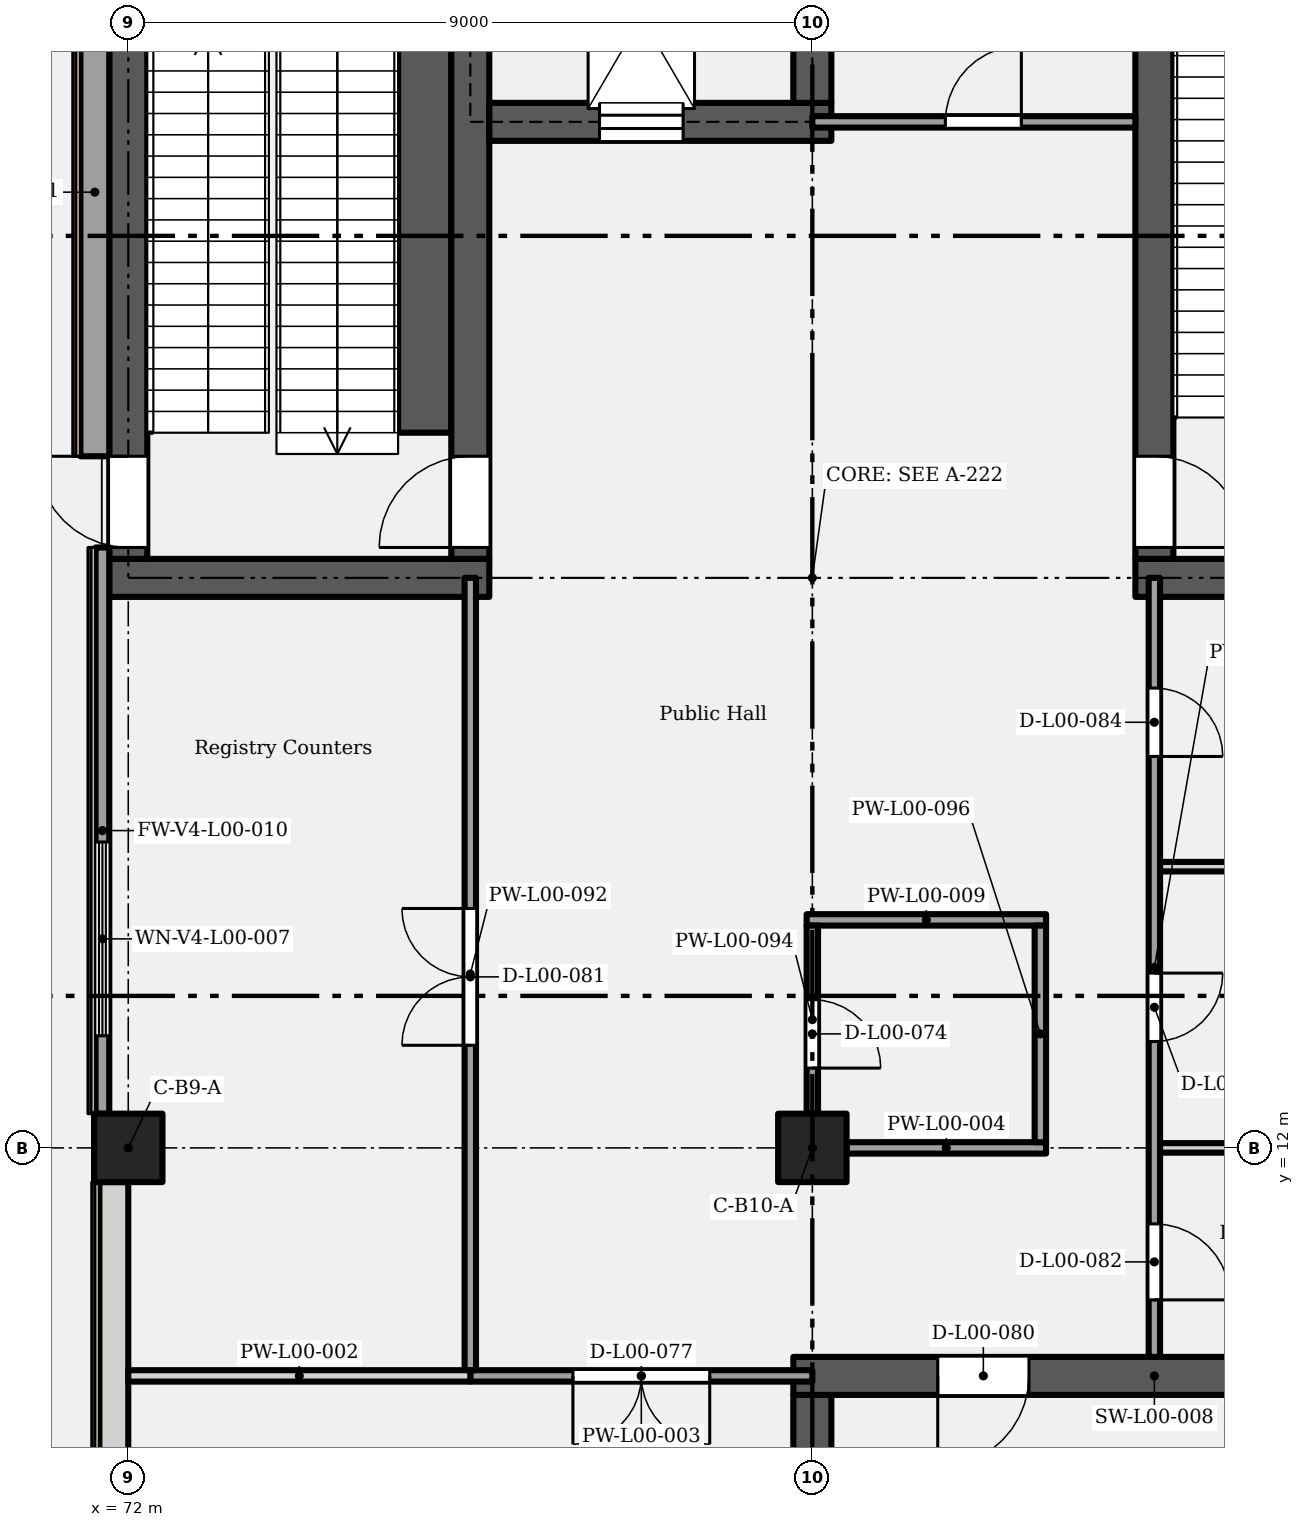
"""IFC4 building model, lengths in metres.
Left out: names, types, materials, properties, quantities, classifications, styles, units other than length and angle.
Written with IfcOpenShell. Run it as: python <this file> out.ifc"""

import sys

from ifc_helpers import new_model, si_unit, direction, frame, frame_2d, origin, origin_2d, place, context, subcontext, project, spatial, rectangle, extrude, element, fill, save


model = new_model("IFC4")
c1 = context("Model", 3, precision=1e-05, world=origin(), true_north=direction((0.0, 1.0)))
c2 = subcontext(c1, "Body", "Model", "MODEL_VIEW")
j1 = project(units=[si_unit("LENGTHUNIT", "METRE"), si_unit("PLANEANGLEUNIT", "RADIAN")], contexts=[c1])
p1 = place(None, origin())
s1 = spatial("IfcSite", under=j1, at=p1, CompositionType="ELEMENT")
p2 = place(p1, origin())
s2 = spatial("IfcBuilding", under=s1, at=p2, CompositionType="ELEMENT")
p3 = place(p2, origin())
s3 = spatial("IfcBuildingStorey", under=s2, at=p3, CompositionType="ELEMENT", Elevation=0.0)
for number, where, z_axis, x_axis in (
    (1, (72.0, 12.0, 0.0), (0.0, 0.0, 1.0), (1.0, 0.0, 0.0)),
    (2, (81.0, 12.0, 0.0), (0.0, 0.0, 1.0), (1.0, 0.0, 0.0)),
):
    element("IfcColumn", number, at=place(p3, frame(where, z_axis=z_axis, x_axis=x_axis)), inside=s3, PredefinedType="COLUMN", context=c2, shape_type="SweptSolid", body=[
        extrude(rectangle(XDim=0.9, YDim=0.9, at=origin_2d()), origin(), (0.0, 0.0, 1.0), 6.6),
    ])
p4 = place(p3, frame((81.0, 0.45, 0.0), z_axis=(0.0, 0.0, 1.0), x_axis=(0.0, 1.0, 0.0)))
e3 = element("IfcWall", 3, at=p4, inside=s3, PredefinedType="SHEAR", context=c2, shape_type="SweptSolid", body=[
    extrude(rectangle(XDim=8.3, YDim=0.5, at=frame_2d((4.15, 0.0))), origin(), (0.0, 0.0, 1.0), 6.3),
])
p5 = place(p3, frame((80.75, 9.0, 0.0), z_axis=(0.0, 0.0, 1.0), x_axis=(1.0, 0.0, 0.0)))
e4 = element("IfcWall", 4, at=p5, inside=s3, PredefinedType="SHEAR", context=c2, shape_type="SweptSolid", body=[
    extrude(rectangle(XDim=9.5, YDim=0.5, at=frame_2d((4.75, 0.0))), origin(), (0.0, 0.0, 1.0), 6.3),
])
p6 = place(p5, frame((3.1, 0.0, 0.0), z_axis=(0.0, 0.0, 1.0), x_axis=(-1.0, 0.0, 0.0)))
e5 = element("IfcOpeningElement", 5, at=p6, cuts=e4, PredefinedType="OPENING", context=c2, shape_type="SweptSolid", body=[
    extrude(rectangle(XDim=1.2, YDim=2.4, at=frame_2d((0.6, 1.2))), frame((0.0, 0.26, 0.0), z_axis=(0.0, -1.0, 0.0), x_axis=(1.0, 0.0, 0.0)), (0.0, 0.0, 1.0), 0.52),
])
for number, where, z_axis, x_axis in (
    (6, (71.75, 19.5, 0.0), (0.0, 0.0, 1.0), (1.0, 0.0, 0.0)),
    (7, (85.25, 19.5, 0.0), (0.0, 0.0, 1.0), (1.0, 0.0, 0.0)),
):
    element("IfcWall", number, at=place(p3, frame(where, z_axis=z_axis, x_axis=x_axis)), inside=s3, PredefinedType="SHEAR", context=c2, shape_type="SweptSolid", body=[
        extrude(rectangle(XDim=5.0, YDim=0.5, at=frame_2d((2.5, 0.0))), origin(), (0.0, 0.0, 1.0), 6.3),
    ])
p7 = place(p3, frame((72.0, 19.75, 0.0), z_axis=(0.0, 0.0, 1.0), x_axis=(0.0, 1.0, 0.0)))
e8 = element("IfcWall", 8, at=p7, inside=s3, PredefinedType="SHEAR", context=c2, shape_type="SweptSolid", body=[
    extrude(rectangle(XDim=8.3, YDim=0.5, at=frame_2d((4.15, 0.0))), origin(), (0.0, 0.0, 1.0), 6.3),
])
p8 = place(p7, frame((0.15, 0.0, 0.0)))
e9 = element("IfcOpeningElement", 9, at=p8, cuts=e8, PredefinedType="OPENING", context=c2, shape_type="SweptSolid", body=[
    extrude(rectangle(XDim=1.2, YDim=2.1, at=frame_2d((0.6, 1.05))), frame((0.0, 0.26, 0.0), z_axis=(0.0, -1.0, 0.0), x_axis=(1.0, 0.0, 0.0)), (0.0, 0.0, 1.0), 0.52),
])
p9 = place(p3, frame((76.5, 19.75, 0.0), z_axis=(0.0, 0.0, 1.0), x_axis=(0.0, 1.0, 0.0)))
e10 = element("IfcWall", 10, at=p9, inside=s3, PredefinedType="SHEAR", context=c2, shape_type="SweptSolid", body=[
    extrude(rectangle(XDim=8.5, YDim=0.5, at=frame_2d((4.25, 0.0))), origin(), (0.0, 0.0, 1.0), 6.3),
])
p10 = place(p9, frame((0.15, 0.0, 0.0)))
e11 = element("IfcOpeningElement", 11, at=p10, cuts=e10, PredefinedType="OPENING", context=c2, shape_type="SweptSolid", body=[
    extrude(rectangle(XDim=1.2, YDim=2.4, at=frame_2d((0.6, 1.2))), frame((0.0, 0.26, 0.0), z_axis=(0.0, -1.0, 0.0), x_axis=(1.0, 0.0, 0.0)), (0.0, 0.0, 1.0), 0.52),
])
p11 = place(p3, frame((85.5, 19.75, 0.0), z_axis=(0.0, 0.0, 1.0), x_axis=(0.0, 1.0, 0.0)))
e12 = element("IfcWall", 12, at=p11, inside=s3, PredefinedType="SHEAR", context=c2, shape_type="SweptSolid", body=[
    extrude(rectangle(XDim=8.5, YDim=0.5, at=frame_2d((4.25, 0.0))), origin(), (0.0, 0.0, 1.0), 6.3),
])
p12 = place(p11, frame((1.35, 0.0, 0.0), z_axis=(0.0, 0.0, 1.0), x_axis=(-1.0, 0.0, 0.0)))
e13 = element("IfcOpeningElement", 13, at=p12, cuts=e12, PredefinedType="OPENING", context=c2, shape_type="SweptSolid", body=[
    extrude(rectangle(XDim=1.2, YDim=2.4, at=frame_2d((0.6, 1.2))), frame((0.0, 0.26, 0.0), z_axis=(0.0, -1.0, 0.0), x_axis=(1.0, 0.0, 0.0)), (0.0, 0.0, 1.0), 0.52),
])
p13 = place(p3, frame((76.75, 25.5, 0.0), z_axis=(0.0, 0.0, 1.0), x_axis=(1.0, 0.0, 0.0)))
e14 = element("IfcWall", 14, at=p13, inside=s3, PredefinedType="SHEAR", context=c2, shape_type="SweptSolid", body=[
    extrude(rectangle(XDim=4.5, YDim=0.5, at=frame_2d((2.25, 0.0))), origin(), (0.0, 0.0, 1.0), 6.3),
])
p14 = place(p13, frame((1.45, 0.0, 0.0)))
e15 = element("IfcOpeningElement", 15, at=p14, cuts=e14, PredefinedType="OPENING", context=c2, shape_type="SweptSolid", body=[
    extrude(rectangle(XDim=1.1, YDim=2.1, at=frame_2d((0.55, 1.05))), frame((0.0, 0.26, 0.0), z_axis=(0.0, -1.0, 0.0), x_axis=(1.0, 0.0, 0.0)), (0.0, 0.0, 1.0), 0.52),
])
p15 = place(p3, frame((81.0, 25.75, 0.0), z_axis=(0.0, 0.0, 1.0), x_axis=(0.0, 1.0, 0.0)))
e16 = element("IfcWall", 16, at=p15, inside=s3, PredefinedType="SHEAR", context=c2, shape_type="SweptSolid", body=[
    extrude(rectangle(XDim=2.3, YDim=0.5, at=frame_2d((1.15, 0.0))), origin(), (0.0, 0.0, 1.0), 6.3),
])
p16 = place(p3, frame((71.81, 0.45, 0.0), z_axis=(0.0, 0.0, 1.0), x_axis=(0.0, 1.0, 0.0)))
e17 = element("IfcWall", 17, at=p16, inside=s3, PredefinedType="SOLIDWALL", context=c2, shape_type="SweptSolid", body=[
    extrude(rectangle(XDim=11.1, YDim=0.38, at=frame_2d((5.55, 0.0))), origin(), (0.0, 0.0, 1.0), 6.3),
])
p17 = place(p16, frame((1.275, 0.0, 0.9)))
e18 = element("IfcOpeningElement", 18, at=p17, cuts=e17, PredefinedType="OPENING", context=c2, shape_type="SweptSolid", body=[
    extrude(rectangle(XDim=2.55, YDim=2.55, at=frame_2d((1.275, 1.275))), frame((0.0, 0.2, 0.0), z_axis=(0.0, -1.0, 0.0), x_axis=(1.0, 0.0, 0.0)), (0.0, 0.0, 1.0), 0.4),
])
p18 = place(p3, frame((71.66, 12.45, 0.0), z_axis=(0.0, 0.0, 1.0), x_axis=(0.0, 1.0, 0.0)))
e19 = element("IfcWall", 19, at=p18, inside=s3, PredefinedType="SOLIDWALL", context=c2, shape_type="SweptSolid", body=[
    extrude(rectangle(XDim=7.45, YDim=0.18, at=frame_2d((3.725, 0.0))), origin(), (0.0, 0.0, 1.0), 6.3),
])
p19 = place(p18, frame((1.025, 0.0, 0.9)))
e20 = element("IfcOpeningElement", 20, at=p19, cuts=e19, PredefinedType="OPENING", context=c2, shape_type="SweptSolid", body=[
    extrude(rectangle(XDim=2.55, YDim=2.55, at=frame_2d((1.275, 1.275))), frame((0.0, 0.1, 0.0), z_axis=(0.0, -1.0, 0.0), x_axis=(1.0, 0.0, 0.0)), (0.0, 0.0, 1.0), 0.2),
])
p20 = place(p3, frame((71.56, 21.1, 0.0), z_axis=(0.0, 0.0, 1.0), x_axis=(0.0, 1.0, 0.0)))
e21 = element("IfcWall", 21, at=p20, inside=s3, PredefinedType="SOLIDWALL", context=c2, shape_type="SweptSolid", body=[
    extrude(rectangle(XDim=6.95, YDim=0.38, at=frame_2d((3.475, 0.0))), origin(), (0.0, 0.0, 1.0), 6.3),
])
p21 = place(p3, frame((72.0, 9.0, 0.0), z_axis=(0.0, 0.0, 1.0), x_axis=(1.0, 0.0, 0.0)))
e22 = element("IfcWall", 22, at=p21, inside=s3, PredefinedType="PARTITIONING", context=c2, shape_type="SweptSolid", body=[
    extrude(rectangle(XDim=4.5, YDim=0.15, at=frame_2d((2.25, 0.0))), origin(), (0.0, 0.0, 1.0), 6.3),
])
p22 = place(p3, frame((76.5, 9.0, 0.0), z_axis=(0.0, 0.0, 1.0), x_axis=(1.0, 0.0, 0.0)))
e23 = element("IfcWall", 23, at=p22, inside=s3, PredefinedType="PARTITIONING", context=c2, shape_type="SweptSolid", body=[
    extrude(rectangle(XDim=4.5, YDim=0.15, at=frame_2d((2.25, 0.0))), origin(), (0.0, 0.0, 1.0), 6.3),
])
p23 = place(p22, frame((3.15, 0.0, 0.0), z_axis=(0.0, 0.0, 1.0), x_axis=(-1.0, 0.0, 0.0)))
e24 = element("IfcOpeningElement", 24, at=p23, cuts=e23, PredefinedType="OPENING", context=c2, shape_type="SweptSolid", body=[
    extrude(rectangle(XDim=1.8, YDim=2.4, at=frame_2d((0.9, 1.2))), frame((0.0, 0.085, 0.0), z_axis=(0.0, -1.0, 0.0), x_axis=(1.0, 0.0, 0.0)), (0.0, 0.0, 1.0), 0.17),
])
p24 = place(p3, frame((81.45, 12.0, 0.0), z_axis=(0.0, 0.0, 1.0), x_axis=(1.0, 0.0, 0.0)))
e25 = element("IfcWall", 25, at=p24, inside=s3, PredefinedType="PARTITIONING", context=c2, shape_type="SweptSolid", body=[
    extrude(rectangle(XDim=2.625, YDim=0.15, at=frame_2d((1.312, 0.0))), origin(), (0.0, 0.0, 1.0), 5.55),
])
p25 = place(p3, frame((85.575, 12.0, 0.0), z_axis=(0.0, 0.0, 1.0), x_axis=(1.0, 0.0, 0.0)))
e26 = element("IfcWall", 26, at=p25, inside=s3, PredefinedType="PARTITIONING", context=c2, shape_type="SweptSolid", body=[
    extrude(rectangle(XDim=3.975, YDim=0.125, at=frame_2d((1.988, 0.0))), origin(), (0.0, 0.0, 1.0), 5.55),
])
p26 = place(p3, frame((80.925, 15.0, 0.0), z_axis=(0.0, 0.0, 1.0), x_axis=(1.0, 0.0, 0.0)))
e27 = element("IfcWall", 27, at=p26, inside=s3, PredefinedType="PARTITIONING", context=c2, shape_type="SweptSolid", body=[
    extrude(rectangle(XDim=3.15, YDim=0.15, at=frame_2d((1.575, 0.0))), origin(), (0.0, 0.0, 1.0), 6.3),
])
p27 = place(p3, frame((85.575, 15.7, 0.0), z_axis=(0.0, 0.0, 1.0), x_axis=(1.0, 0.0, 0.0)))
e28 = element("IfcWall", 28, at=p27, inside=s3, PredefinedType="PARTITIONING", context=c2, shape_type="SweptSolid", body=[
    extrude(rectangle(XDim=4.675, YDim=0.125, at=frame_2d((2.337, 0.0))), origin(), (0.0, 0.0, 1.0), 6.3),
])
p28 = place(p3, frame((81.0, 25.5, 0.0), z_axis=(0.0, 0.0, 1.0), x_axis=(1.0, 0.0, 0.0)))
e29 = element("IfcWall", 29, at=p28, inside=s3, PredefinedType="PARTITIONING", context=c2, shape_type="SweptSolid", body=[
    extrude(rectangle(XDim=4.25, YDim=0.15, at=frame_2d((2.125, 0.0))), origin(), (0.0, 0.0, 1.0), 6.3),
])
p29 = place(p28, frame((1.75, 0.0, 0.0)))
e30 = element("IfcOpeningElement", 30, at=p29, cuts=e29, PredefinedType="OPENING", context=c2, shape_type="SweptSolid", body=[
    extrude(rectangle(XDim=1.0, YDim=2.4, at=frame_2d((0.5, 1.2))), frame((0.0, 0.085, 0.0), z_axis=(0.0, -1.0, 0.0), x_axis=(1.0, 0.0, 0.0)), (0.0, 0.0, 1.0), 0.17),
])
p30 = place(p3, frame((76.5, 9.075, 0.0), z_axis=(0.0, 0.0, 1.0), x_axis=(0.0, 1.0, 0.0)))
e31 = element("IfcWall", 31, at=p30, inside=s3, PredefinedType="PARTITIONING", context=c2, shape_type="SweptSolid", body=[
    extrude(rectangle(XDim=10.425, YDim=0.15, at=frame_2d((5.212, 0.0))), origin(), (0.0, 0.0, 1.0), 6.3),
])
p31 = place(p30, frame((4.275, 0.0, 0.0)))
e32 = element("IfcOpeningElement", 32, at=p31, cuts=e31, PredefinedType="OPENING", context=c2, shape_type="SweptSolid", body=[
    extrude(rectangle(XDim=1.8, YDim=2.4, at=frame_2d((0.9, 1.2))), frame((0.0, 0.085, 0.0), z_axis=(0.0, -1.0, 0.0), x_axis=(1.0, 0.0, 0.0)), (0.0, 0.0, 1.0), 0.17),
])
p32 = place(p3, frame((81.0, 12.45, 0.0), z_axis=(0.0, 0.0, 1.0), x_axis=(0.0, 1.0, 0.0)))
e33 = element("IfcWall", 33, at=p32, inside=s3, PredefinedType="PARTITIONING", context=c2, shape_type="SweptSolid", body=[
    extrude(rectangle(XDim=2.475, YDim=0.15, at=frame_2d((1.238, 0.0))), origin(), (0.0, 0.0, 1.0), 5.35),
])
p33 = place(p32, frame((1.5, 0.0, 0.0), z_axis=(0.0, 0.0, 1.0), x_axis=(-1.0, 0.0, 0.0)))
e34 = element("IfcOpeningElement", 34, at=p33, cuts=e33, PredefinedType="OPENING", context=c2, shape_type="SweptSolid", body=[
    extrude(rectangle(XDim=0.9, YDim=2.4, at=frame_2d((0.45, 1.2))), frame((0.0, 0.085, 0.0), z_axis=(0.0, -1.0, 0.0), x_axis=(1.0, 0.0, 0.0)), (0.0, 0.0, 1.0), 0.17),
])
p34 = place(p3, frame((84.0, 12.075, 0.0), z_axis=(0.0, 0.0, 1.0), x_axis=(0.0, 1.0, 0.0)))
e35 = element("IfcWall", 35, at=p34, inside=s3, PredefinedType="PARTITIONING", context=c2, shape_type="SweptSolid", body=[
    extrude(rectangle(XDim=2.85, YDim=0.15, at=frame_2d((1.425, 0.0))), origin(), (0.0, 0.0, 1.0), 6.3),
])
p35 = place(p3, frame((85.5, 9.25, 0.0), z_axis=(0.0, 0.0, 1.0), x_axis=(0.0, 1.0, 0.0)))
e36 = element("IfcWall", 36, at=p35, inside=s3, PredefinedType="PARTITIONING", context=c2, shape_type="SweptSolid", body=[
    extrude(rectangle(XDim=10.25, YDim=0.15, at=frame_2d((5.125, 0.0))), origin(), (0.0, 0.0, 1.0), 6.3),
])
p36 = place(p35, frame((1.75, 0.0, 0.0), z_axis=(0.0, 0.0, 1.0), x_axis=(-1.0, 0.0, 0.0)))
e37 = element("IfcOpeningElement", 37, at=p36, cuts=e36, PredefinedType="OPENING", context=c2, shape_type="SweptSolid", body=[
    extrude(rectangle(XDim=1.0, YDim=2.4, at=frame_2d((0.5, 1.2))), frame((0.0, 0.085, 0.0), z_axis=(0.0, -1.0, 0.0), x_axis=(1.0, 0.0, 0.0)), (0.0, 0.0, 1.0), 0.17),
])
p37 = place(p35, frame((5.05, 0.0, 0.0), z_axis=(0.0, 0.0, 1.0), x_axis=(-1.0, 0.0, 0.0)))
e38 = element("IfcOpeningElement", 38, at=p37, cuts=e36, PredefinedType="OPENING", context=c2, shape_type="SweptSolid", body=[
    extrude(rectangle(XDim=0.9, YDim=2.4, at=frame_2d((0.45, 1.2))), frame((0.0, 0.085, 0.0), z_axis=(0.0, -1.0, 0.0), x_axis=(1.0, 0.0, 0.0)), (0.0, 0.0, 1.0), 0.17),
])
p38 = place(p35, frame((8.8, 0.0, 0.0), z_axis=(0.0, 0.0, 1.0), x_axis=(-1.0, 0.0, 0.0)))
e39 = element("IfcOpeningElement", 39, at=p38, cuts=e36, PredefinedType="OPENING", context=c2, shape_type="SweptSolid", body=[
    extrude(rectangle(XDim=0.9, YDim=2.4, at=frame_2d((0.45, 1.2))), frame((0.0, 0.085, 0.0), z_axis=(0.0, -1.0, 0.0), x_axis=(1.0, 0.0, 0.0)), (0.0, 0.0, 1.0), 0.17),
])
p39 = place(p3, frame((75.9, 21.41, 0.0), z_axis=(0.0, 0.0, 1.0), x_axis=(0.0, 1.0, 0.0)))
e40 = element("IfcWall", 40, at=p39, inside=s3, PredefinedType="SHEAR", context=c2, shape_type="SweptSolid", body=[
    extrude(rectangle(XDim=6.64, YDim=0.7, at=frame_2d((3.32, 0.0))), origin(), (0.0, 0.0, 1.0), 3.1),
])
p40 = place(p19, origin())
e41 = element("IfcWindow", 41, at=p40, inside=s3, PartitioningType="SINGLE_PANEL", PredefinedType="WINDOW", context=c2, shape_type="SweptSolid", body=[
    extrude(rectangle(XDim=2.55, YDim=2.55, at=frame_2d((1.275, 1.275))), frame((0.0, 0.03, 0.0), z_axis=(0.0, -1.0, 0.0), x_axis=(1.0, 0.0, 0.0)), (0.0, 0.0, 1.0), 0.06),
])
fill(e20, e41)
p41 = place(p8, origin())
e42 = element("IfcDoor", 42, at=p41, inside=s3, OperationType="SINGLE_SWING_LEFT", PredefinedType="DOOR", context=c2, shape_type="SweptSolid", body=[
    extrude(rectangle(XDim=1.2, YDim=2.1, at=frame_2d((0.6, 1.05))), frame((0.0, 0.025, 0.0), z_axis=(0.0, -1.0, 0.0), x_axis=(1.0, 0.0, 0.0)), (0.0, 0.0, 1.0), 0.05),
])
fill(e9, e42)
p42 = place(p33, origin())
e43 = element("IfcDoor", 43, at=p42, inside=s3, OperationType="SINGLE_SWING_RIGHT", PredefinedType="DOOR", context=c2, shape_type="SweptSolid", body=[
    extrude(rectangle(XDim=0.9, YDim=2.4, at=frame_2d((0.45, 1.2))), frame((0.0, 0.025, 0.0), z_axis=(0.0, -1.0, 0.0), x_axis=(1.0, 0.0, 0.0)), (0.0, 0.0, 1.0), 0.05),
])
fill(e34, e43)
p43 = place(p23, origin())
e44 = element("IfcDoor", 44, at=p43, inside=s3, OperationType="DOUBLE_DOOR_SINGLE_SWING", PredefinedType="DOOR", context=c2, shape_type="SweptSolid", body=[
    extrude(rectangle(XDim=1.8, YDim=2.4, at=frame_2d((0.9, 1.2))), frame((0.0, 0.025, 0.0), z_axis=(0.0, -1.0, 0.0), x_axis=(1.0, 0.0, 0.0)), (0.0, 0.0, 1.0), 0.05),
])
fill(e24, e44)
p44 = place(p6, origin())
e45 = element("IfcDoor", 45, at=p44, inside=s3, OperationType="SINGLE_SWING_RIGHT", PredefinedType="DOOR", context=c2, shape_type="SweptSolid", body=[
    extrude(rectangle(XDim=1.2, YDim=2.4, at=frame_2d((0.6, 1.2))), frame((0.0, 0.025, 0.0), z_axis=(0.0, -1.0, 0.0), x_axis=(1.0, 0.0, 0.0)), (0.0, 0.0, 1.0), 0.05),
])
fill(e5, e45)
p45 = place(p31, origin())
e46 = element("IfcDoor", 46, at=p45, inside=s3, OperationType="DOUBLE_DOOR_SINGLE_SWING", PredefinedType="DOOR", context=c2, shape_type="SweptSolid", body=[
    extrude(rectangle(XDim=1.8, YDim=2.4, at=frame_2d((0.9, 1.2))), frame((0.0, 0.025, 0.0), z_axis=(0.0, -1.0, 0.0), x_axis=(1.0, 0.0, 0.0)), (0.0, 0.0, 1.0), 0.05),
])
fill(e32, e46)
p46 = place(p36, origin())
e47 = element("IfcDoor", 47, at=p46, inside=s3, OperationType="SINGLE_SWING_RIGHT", PredefinedType="DOOR", context=c2, shape_type="SweptSolid", body=[
    extrude(rectangle(XDim=1.0, YDim=2.4, at=frame_2d((0.5, 1.2))), frame((0.0, 0.025, 0.0), z_axis=(0.0, -1.0, 0.0), x_axis=(1.0, 0.0, 0.0)), (0.0, 0.0, 1.0), 0.05),
])
fill(e37, e47)
p47 = place(p37, origin())
e48 = element("IfcDoor", 48, at=p47, inside=s3, OperationType="SINGLE_SWING_LEFT", PredefinedType="DOOR", context=c2, shape_type="SweptSolid", body=[
    extrude(rectangle(XDim=0.9, YDim=2.4, at=frame_2d((0.45, 1.2))), frame((0.0, 0.025, 0.0), z_axis=(0.0, -1.0, 0.0), x_axis=(1.0, 0.0, 0.0)), (0.0, 0.0, 1.0), 0.05),
])
fill(e38, e48)
p48 = place(p38, origin())
e49 = element("IfcDoor", 49, at=p48, inside=s3, OperationType="SINGLE_SWING_RIGHT", PredefinedType="DOOR", context=c2, shape_type="SweptSolid", body=[
    extrude(rectangle(XDim=0.9, YDim=2.4, at=frame_2d((0.45, 1.2))), frame((0.0, 0.025, 0.0), z_axis=(0.0, -1.0, 0.0), x_axis=(1.0, 0.0, 0.0)), (0.0, 0.0, 1.0), 0.05),
])
fill(e39, e49)
p49 = place(p29, origin())
e50 = element("IfcDoor", 50, at=p49, inside=s3, OperationType="SINGLE_SWING_RIGHT", PredefinedType="DOOR", context=c2, shape_type="SweptSolid", body=[
    extrude(rectangle(XDim=1.0, YDim=2.4, at=frame_2d((0.5, 1.2))), frame((0.0, 0.025, 0.0), z_axis=(0.0, -1.0, 0.0), x_axis=(1.0, 0.0, 0.0)), (0.0, 0.0, 1.0), 0.05),
])
fill(e30, e50)
p50 = place(p14, origin())
e51 = element("IfcDoor", 51, at=p50, inside=s3, OperationType="SLIDING_TO_LEFT", PredefinedType="DOOR", context=c2, shape_type="SweptSolid", body=[
    extrude(rectangle(XDim=1.1, YDim=2.1, at=frame_2d((0.55, 1.05))), frame((0.0, 0.025, 0.0), z_axis=(0.0, -1.0, 0.0), x_axis=(1.0, 0.0, 0.0)), (0.0, 0.0, 1.0), 0.05),
])
fill(e15, e51)
p51 = place(p10, origin())
e52 = element("IfcDoor", 52, at=p51, inside=s3, OperationType="SINGLE_SWING_LEFT", PredefinedType="DOOR", context=c2, shape_type="SweptSolid", body=[
    extrude(rectangle(XDim=1.2, YDim=2.4, at=frame_2d((0.6, 1.2))), frame((0.0, 0.025, 0.0), z_axis=(0.0, -1.0, 0.0), x_axis=(1.0, 0.0, 0.0)), (0.0, 0.0, 1.0), 0.05),
])
fill(e11, e52)
p52 = place(p12, origin())
e53 = element("IfcDoor", 53, at=p52, inside=s3, OperationType="SINGLE_SWING_RIGHT", PredefinedType="DOOR", context=c2, shape_type="SweptSolid", body=[
    extrude(rectangle(XDim=1.2, YDim=2.4, at=frame_2d((0.6, 1.2))), frame((0.0, 0.025, 0.0), z_axis=(0.0, -1.0, 0.0), x_axis=(1.0, 0.0, 0.0)), (0.0, 0.0, 1.0), 0.05),
])
fill(e13, e53)
save(model, sys.argv[1])
